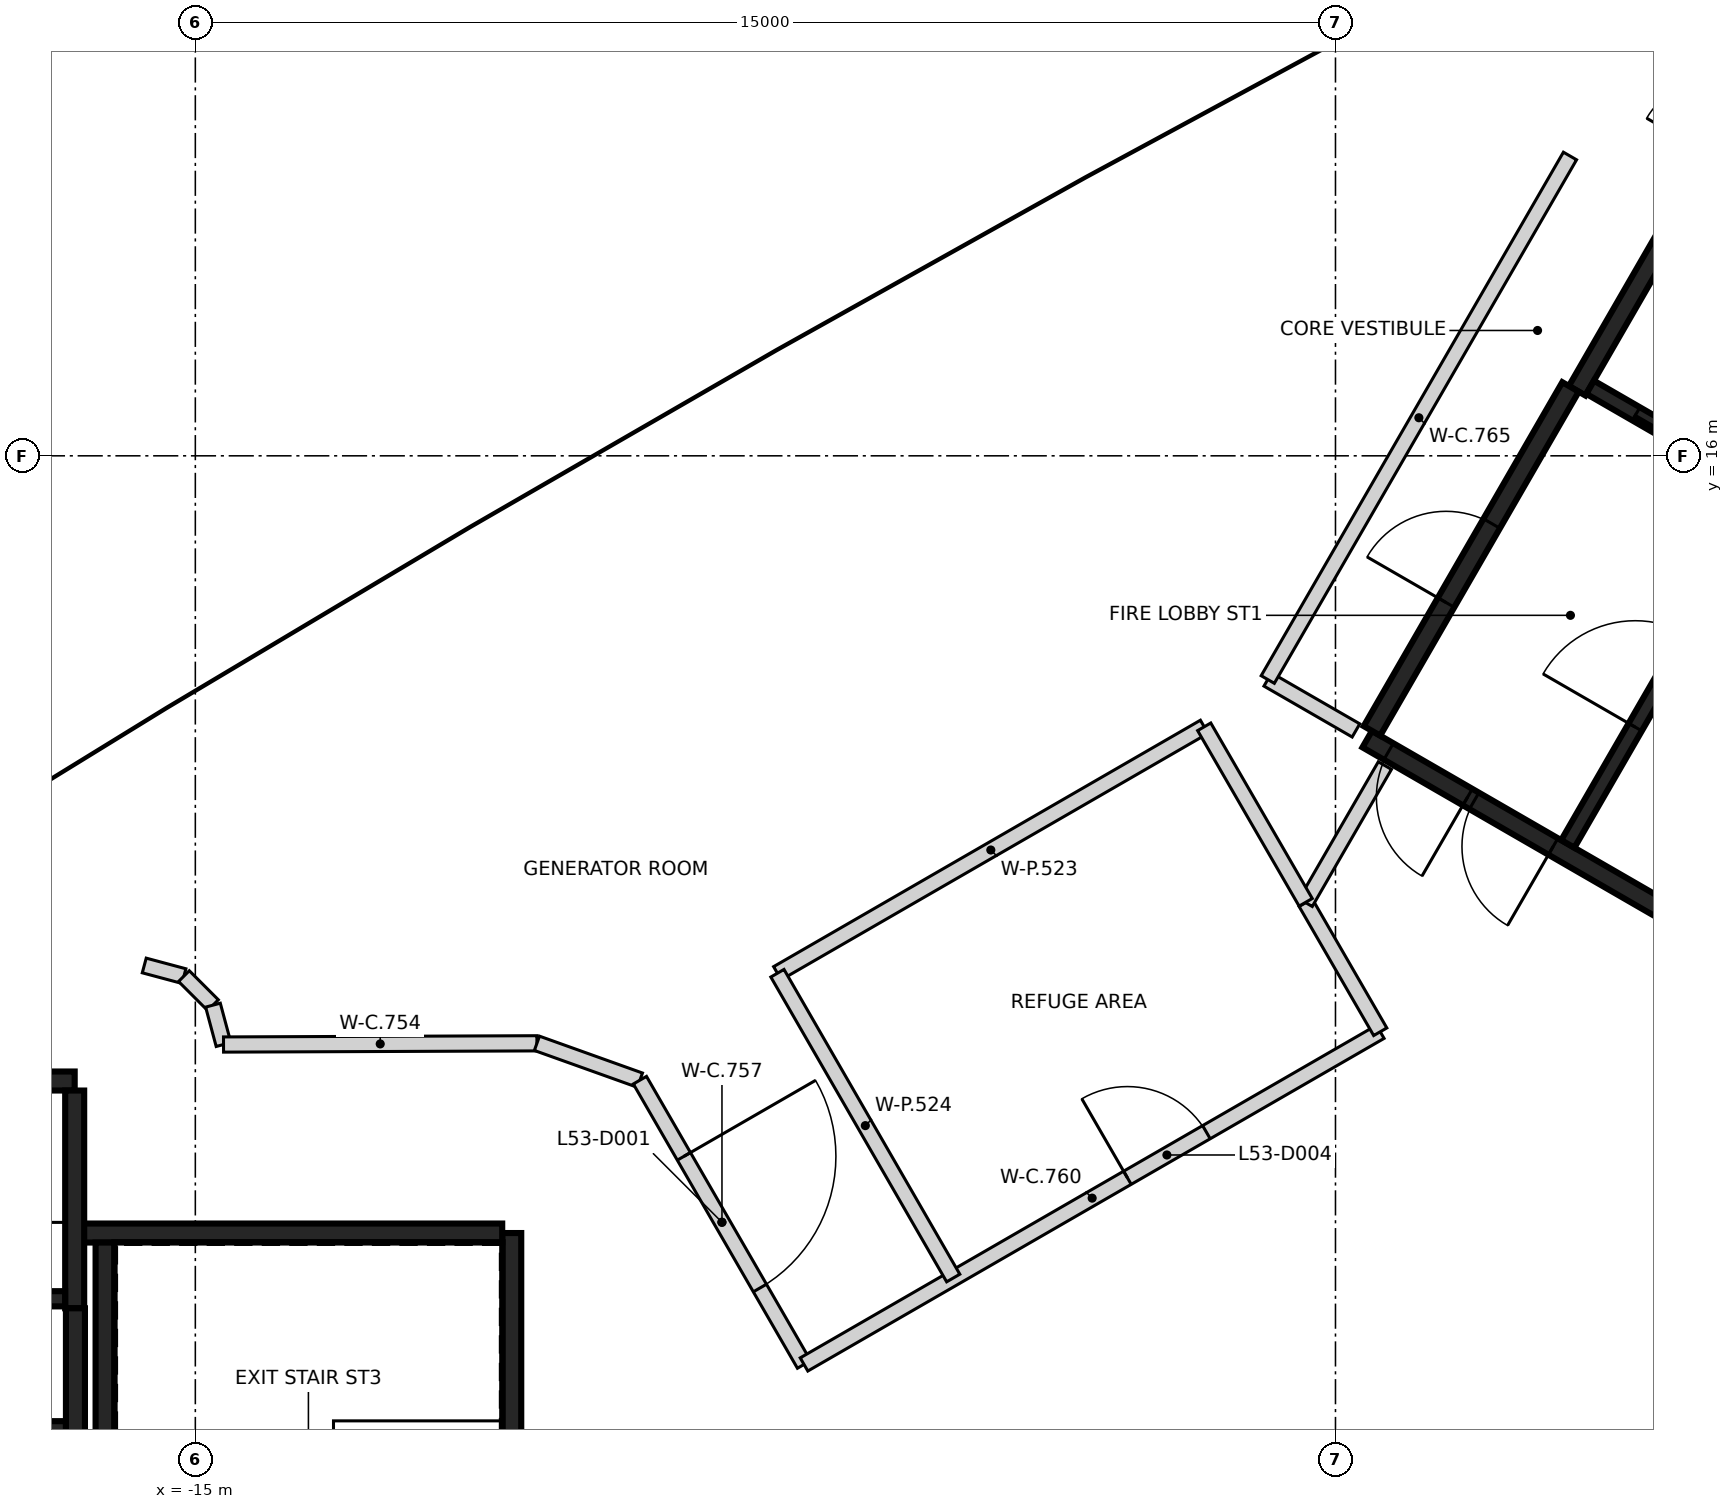
"""IFC4 building model, lengths in metres.
Left out: names, types, materials, properties, quantities, classifications, styles, units other than length and angle.
Written with IfcOpenShell. Run it as: python <this file> out.ifc"""

import sys

from ifc_helpers import new_model, si_unit, direction, frame, frame_2d, origin, place, context, subcontext, project, spatial, rectangle, extrude, element, fill, save


model = new_model("IFC4")
c1 = context("Model", 3, precision=1e-05, world=origin(), true_north=direction((0.0, 1.0)))
c2 = subcontext(c1, "Body", "Model", "MODEL_VIEW")
j1 = project(units=[si_unit("LENGTHUNIT", "METRE"), si_unit("PLANEANGLEUNIT", "RADIAN")], contexts=[c1])
p1 = place(None, origin())
s1 = spatial("IfcSite", under=j1, at=p1, CompositionType="ELEMENT")
p2 = place(p1, origin())
s2 = spatial("IfcBuilding", under=s1, at=p2, CompositionType="ELEMENT")
p3 = place(p2, frame((0.0, 0.0, 211.6)))
s3 = spatial("IfcBuildingStorey", under=s2, at=p3, CompositionType="ELEMENT", Elevation=211.6)
p4 = place(p3, frame((-10.837, 5.775, 0.0), z_axis=(0.0, 0.0, 1.0), x_axis=(0.0, -1.0, 0.0)))
e1 = element("IfcWall", 1, at=p4, inside=s3, PredefinedType="SHEAR", context=c2, shape_type="SweptSolid", body=[
    extrude(rectangle(XDim=11.55, YDim=0.25, at=frame_2d((5.775, 0.0))), origin(), (0.0, 0.0, 1.0), 4.45),
])
p5 = place(p4, frame((10.025, 0.0, 0.0)))
e2 = element("IfcOpeningElement", 2, at=p5, cuts=e1, PredefinedType="OPENING", context=c2, shape_type="SweptSolid", body=[
    extrude(rectangle(XDim=1.2, YDim=2.1, at=frame_2d((0.6, 1.05))), frame((0.0, 0.135, 0.0), z_axis=(0.0, -1.0, 0.0), x_axis=(1.0, 0.0, 0.0)), (0.0, 0.0, 1.0), 0.27),
])
p6 = place(p4, frame((8.725, 0.0, 0.0)))
e3 = element("IfcOpeningElement", 3, at=p6, cuts=e1, PredefinedType="OPENING", context=c2, shape_type="SweptSolid", body=[
    extrude(rectangle(XDim=1.2, YDim=2.1, at=frame_2d((0.6, 1.05))), frame((0.0, 0.135, 0.0), z_axis=(0.0, -1.0, 0.0), x_axis=(1.0, 0.0, 0.0)), (0.0, 0.0, 1.0), 0.27),
])
p7 = place(p3, frame((-16.472, 5.775, 0.0), z_axis=(0.0, 0.0, 1.0), x_axis=(1.0, 0.0, 0.0)))
e4 = element("IfcWall", 4, at=p7, inside=s3, PredefinedType="SHEAR", context=c2, shape_type="SweptSolid", body=[
    extrude(rectangle(XDim=5.51, YDim=0.25, at=frame_2d((2.755, 0.0))), origin(), (0.0, 0.0, 1.0), 4.45),
])
p8 = place(p3, frame((-19.637, 7.775, 0.0), z_axis=(0.0, 0.0, 1.0), x_axis=(1.0, 0.0, 0.0)))
e5 = element("IfcWall", 5, at=p8, inside=s3, PredefinedType="SHEAR", context=c2, shape_type="SweptSolid", body=[
    extrude(rectangle(XDim=3.05, YDim=0.25, at=frame_2d((1.525, 0.0))), origin(), (0.0, 0.0, 1.0), 4.45),
])
p9 = place(p3, frame((-16.587, 7.65, 0.0), z_axis=(0.0, 0.0, 1.0), x_axis=(0.0, -1.0, 0.0)))
e6 = element("IfcWall", 6, at=p9, inside=s3, PredefinedType="SHEAR", context=c2, shape_type="SweptSolid", body=[
    extrude(rectangle(XDim=2.865, YDim=0.25, at=frame_2d((1.432, 0.0))), origin(), (0.0, 0.0, 1.0), 4.45),
])
p10 = place(p3, frame((-16.187, 3.075, 0.0), z_axis=(0.0, 0.0, 1.0), x_axis=(0.0, 1.0, 0.0)))
e7 = element("IfcWall", 7, at=p10, inside=s3, PredefinedType="SHEAR", context=c2, shape_type="SweptSolid", body=[
    extrude(rectangle(XDim=2.575, YDim=0.25, at=frame_2d((1.287, 0.0))), origin(), (0.0, 0.0, 1.0), 4.45),
])
p11 = place(p3, frame((-16.577, 4.785, 0.0), z_axis=(0.0, 0.0, 1.0), x_axis=(0.0, -1.0, 0.0)))
e8 = element("IfcWall", 8, at=p11, inside=s3, PredefinedType="SHEAR", context=c2, shape_type="SweptSolid", body=[
    extrude(rectangle(XDim=1.71, YDim=0.25, at=frame_2d((0.855, 0.0))), origin(), (0.0, 0.0, 1.0), 4.45),
])
p12 = place(p3, frame((-19.511, 4.91, 0.0), z_axis=(0.0, 0.0, 1.0), x_axis=(1.0, 0.0, 0.0)))
e9 = element("IfcWall", 9, at=p12, inside=s3, PredefinedType="SHEAR", context=c2, shape_type="SweptSolid", body=[
    extrude(rectangle(XDim=2.798, YDim=0.2, at=frame_2d((1.399, 0.0))), origin(), (0.0, 0.0, 1.0), 4.45),
])
p13 = place(p12, frame((0.949, 0.0, 0.0)))
e10 = element("IfcOpeningElement", 10, at=p13, cuts=e9, PredefinedType="OPENING", context=c2, shape_type="SweptSolid", body=[
    extrude(rectangle(XDim=0.9, YDim=2.1, at=frame_2d((0.45, 1.05))), frame((0.0, 0.11, 0.0), z_axis=(0.0, -1.0, 0.0), x_axis=(1.0, 0.0, 0.0)), (0.0, 0.0, 1.0), 0.22),
])
p14 = place(p3, frame((-19.462, 3.2, 0.0), z_axis=(0.0, 0.0, 1.0), x_axis=(1.0, 0.0, 0.0)))
e11 = element("IfcWall", 11, at=p14, inside=s3, PredefinedType="SHEAR", context=c2, shape_type="SweptSolid", body=[
    extrude(rectangle(XDim=2.759, YDim=0.2, at=frame_2d((1.379, 0.0))), origin(), (0.0, 0.0, 1.0), 4.45),
])
p15 = place(p3, frame((10.42, 6.498, 0.0), z_axis=(0.0, 0.0, 1.0), x_axis=(-0.866021906294, 0.500006057782, 0.0)))
e12 = element("IfcWall", 12, at=p15, inside=s3, PredefinedType="SHEAR", context=c2, shape_type="SweptSolid", body=[
    extrude(rectangle(XDim=11.55, YDim=0.25, at=frame_2d((5.775, 0.0))), origin(), (0.0, 0.0, 1.0), 4.45),
])
p16 = place(p15, frame((10.025, 0.0, 0.0)))
e13 = element("IfcOpeningElement", 13, at=p16, cuts=e12, PredefinedType="OPENING", context=c2, shape_type="SweptSolid", body=[
    extrude(rectangle(XDim=1.2, YDim=2.1, at=frame_2d((0.6, 1.05))), frame((0.0, 0.135, 0.0), z_axis=(0.0, -1.0, 0.0), x_axis=(1.0, 0.0, 0.0)), (0.0, 0.0, 1.0), 0.27),
])
p17 = place(p15, frame((8.725, 0.0, 0.0)))
e14 = element("IfcOpeningElement", 14, at=p17, cuts=e12, PredefinedType="OPENING", context=c2, shape_type="SweptSolid", body=[
    extrude(rectangle(XDim=1.2, YDim=2.1, at=frame_2d((0.6, 1.05))), frame((0.0, 0.135, 0.0), z_axis=(0.0, -1.0, 0.0), x_axis=(1.0, 0.0, 0.0)), (0.0, 0.0, 1.0), 0.27),
])
p18 = place(p3, frame((3.179, 16.856, 0.0), z_axis=(0.0, 0.0, 1.0), x_axis=(0.500001955336, 0.866024274868, 0.0)))
e15 = element("IfcWall", 15, at=p18, inside=s3, PredefinedType="SHEAR", context=c2, shape_type="SweptSolid", body=[
    extrude(rectangle(XDim=6.125, YDim=0.25, at=frame_2d((3.062, 0.0))), origin(), (0.0, 0.0, 1.0), 4.45),
])
p19 = place(p18, frame((3.563, 0.0, 0.0)))
e16 = element("IfcOpeningElement", 16, at=p19, cuts=e15, PredefinedType="OPENING", context=c2, shape_type="SweptSolid", body=[
    extrude(rectangle(XDim=1.0, YDim=2.1, at=frame_2d((0.5, 1.05))), frame((0.0, 0.135, 0.0), z_axis=(0.0, -1.0, 0.0), x_axis=(1.0, 0.0, 0.0)), (0.0, 0.0, 1.0), 0.27),
])
p20 = place(p3, frame((0.48, 12.381, 0.0), z_axis=(0.0, 0.0, 1.0), x_axis=(0.49999885962, 0.866026062182, 0.0)))
e17 = element("IfcWall", 17, at=p20, inside=s3, PredefinedType="SHEAR", context=c2, shape_type="SweptSolid", body=[
    extrude(rectangle(XDim=5.225, YDim=0.25, at=frame_2d((2.612, 0.0))), origin(), (0.0, 0.0, 1.0), 4.45),
])
p21 = place(p20, frame((1.95, 0.0, 0.0)))
e18 = element("IfcOpeningElement", 18, at=p21, cuts=e17, PredefinedType="OPENING", context=c2, shape_type="SweptSolid", body=[
    extrude(rectangle(XDim=1.2, YDim=2.1, at=frame_2d((0.6, 1.05))), frame((0.0, 0.135, 0.0), z_axis=(0.0, -1.0, 0.0), x_axis=(1.0, 0.0, 0.0)), (0.0, 0.0, 1.0), 0.27),
])
p22 = place(p3, frame((3.057, 10.895, 0.0), z_axis=(0.0, 0.0, 1.0), x_axis=(0.500027839223, 0.866009330205, 0.0)))
e19 = element("IfcWall", 19, at=p22, inside=s3, PredefinedType="SHEAR", context=c2, shape_type="SweptSolid", body=[
    extrude(rectangle(XDim=5.098, YDim=0.2, at=frame_2d((2.549, 0.0))), origin(), (0.0, 0.0, 1.0), 4.45),
])
p23 = place(p22, frame((1.774, 0.0, 0.0)))
e20 = element("IfcOpeningElement", 20, at=p23, cuts=e19, PredefinedType="OPENING", context=c2, shape_type="SweptSolid", body=[
    extrude(rectangle(XDim=1.4, YDim=2.1, at=frame_2d((0.7, 1.05))), frame((0.0, 0.11, 0.0), z_axis=(0.0, -1.0, 0.0), x_axis=(1.0, 0.0, 0.0)), (0.0, 0.0, 1.0), 0.22),
])
p24 = place(p3, frame((5.646, 15.576, 0.0), z_axis=(0.0, 0.0, 1.0), x_axis=(-0.866018407898, 0.500012117035, 0.0)))
e21 = element("IfcWall", 21, at=p24, inside=s3, PredefinedType="SHEAR", context=c2, shape_type="SweptSolid", body=[
    extrude(rectangle(XDim=2.651, YDim=0.2, at=frame_2d((1.325, 0.0))), origin(), (0.0, 0.0, 1.0), 4.45),
])
p25 = place(p24, frame((0.652, 0.0, 0.0)))
e22 = element("IfcOpeningElement", 22, at=p25, cuts=e21, PredefinedType="OPENING", context=c2, shape_type="SweptSolid", body=[
    extrude(rectangle(XDim=1.3, YDim=2.1, at=frame_2d((0.65, 1.05))), frame((0.0, 0.11, 0.0), z_axis=(0.0, -1.0, 0.0), x_axis=(1.0, 0.0, 0.0)), (0.0, 0.0, 1.0), 0.22),
])
p26 = place(p3, frame((-15.672, 9.295, 0.0), z_axis=(0.0, 0.0, 1.0), x_axis=(0.965942005015, -0.258758657725, 0.0)))
e23 = element("IfcWall", 23, at=p26, inside=s3, PredefinedType="PARTITIONING", context=c2, shape_type="SweptSolid", body=[
    extrude(rectangle(XDim=0.541, YDim=0.2, at=frame_2d((0.27, 0.0))), origin(), (0.0, 0.0, 1.0), 4.45),
])
p27 = place(p3, frame((-15.15, 9.155, 0.0), z_axis=(0.0, 0.0, 1.0), x_axis=(0.706880760177, -0.707332729973, 0.0)))
e24 = element("IfcWall", 24, at=p27, inside=s3, PredefinedType="PARTITIONING", context=c2, shape_type="SweptSolid", body=[
    extrude(rectangle(XDim=0.54, YDim=0.2, at=frame_2d((0.27, 0.0))), origin(), (0.0, 0.0, 1.0), 4.45),
])
p28 = place(p3, frame((-14.768, 8.773, 0.0), z_axis=(0.0, 0.0, 1.0), x_axis=(0.259418497784, -0.965765004029, 0.0)))
e25 = element("IfcWall", 25, at=p28, inside=s3, PredefinedType="PARTITIONING", context=c2, shape_type="SweptSolid", body=[
    extrude(rectangle(XDim=0.536, YDim=0.2, at=frame_2d((0.268, 0.0))), origin(), (0.0, 0.0, 1.0), 4.45),
])
p29 = place(p3, frame((-14.629, 8.255, 0.0), z_axis=(0.0, 0.0, 1.0), x_axis=(0.999992362559, 0.003908302003, 0.0)))
e26 = element("IfcWall", 26, at=p29, inside=s3, PredefinedType="PARTITIONING", context=c2, shape_type="SweptSolid", body=[
    extrude(rectangle(XDim=4.123, YDim=0.2, at=frame_2d((2.062, 0.0))), origin(), (0.0, 0.0, 1.0), 4.45),
])
p30 = place(p3, frame((-10.506, 8.271, 0.0), z_axis=(0.0, 0.0, 1.0), x_axis=(0.941499917848, -0.337013211451, 0.0)))
e27 = element("IfcWall", 27, at=p30, inside=s3, PredefinedType="PARTITIONING", context=c2, shape_type="SweptSolid", body=[
    extrude(rectangle(XDim=1.439, YDim=0.2, at=frame_2d((0.72, 0.0))), origin(), (0.0, 0.0, 1.0), 4.45),
])
p31 = place(p3, frame((-9.151, 7.786, 0.0), z_axis=(0.0, 0.0, 1.0), x_axis=(0.499939416935, -0.866060378608, 0.0)))
e28 = element("IfcWall", 28, at=p31, inside=s3, PredefinedType="PARTITIONING", context=c2, shape_type="SweptSolid", body=[
    extrude(rectangle(XDim=4.318, YDim=0.2, at=frame_2d((2.159, 0.0))), origin(), (0.0, 0.0, 1.0), 4.45),
])
p32 = place(p31, frame((1.157, 0.0, 0.0)))
e29 = element("IfcOpeningElement", 29, at=p32, cuts=e28, PredefinedType="OPENING", context=c2, shape_type="SweptSolid", body=[
    extrude(rectangle(XDim=2.0, YDim=2.1, at=frame_2d((1.0, 1.05))), frame((0.0, 0.11, 0.0), z_axis=(0.0, -1.0, 0.0), x_axis=(1.0, 0.0, 0.0)), (0.0, 0.0, 1.0), 0.22),
])
p33 = place(p3, frame((-6.992, 4.046, 0.0), z_axis=(0.0, 0.0, 1.0), x_axis=(0.866074131153, 0.499915592224, 0.0)))
e30 = element("IfcWall", 30, at=p33, inside=s3, PredefinedType="PARTITIONING", context=c2, shape_type="SweptSolid", body=[
    extrude(rectangle(XDim=8.754, YDim=0.2, at=frame_2d((4.377, 0.0))), origin(), (0.0, 0.0, 1.0), 4.45),
])
p34 = place(p33, frame((4.913, 0.0, 0.0)))
e31 = element("IfcOpeningElement", 31, at=p34, cuts=e30, PredefinedType="OPENING", context=c2, shape_type="SweptSolid", body=[
    extrude(rectangle(XDim=1.2, YDim=2.1, at=frame_2d((0.6, 1.05))), frame((0.0, 0.11, 0.0), z_axis=(0.0, -1.0, 0.0), x_axis=(1.0, 0.0, 0.0)), (0.0, 0.0, 1.0), 0.22),
])
p35 = place(p3, frame((-0.891, 13.057, 0.0), z_axis=(0.0, 0.0, 1.0), x_axis=(0.866206814563, -0.499685655593, 0.0)))
e32 = element("IfcWall", 32, at=p35, inside=s3, PredefinedType="PARTITIONING", context=c2, shape_type="SweptSolid", body=[
    extrude(rectangle(XDim=1.34, YDim=0.2, at=frame_2d((0.67, 0.0))), origin(), (0.0, 0.0, 1.0), 4.45),
])
p36 = place(p3, frame((-0.891, 13.057, 0.0), z_axis=(0.0, 0.0, 1.0), x_axis=(0.499972238474, 0.866041431316, 0.0)))
e33 = element("IfcWall", 33, at=p36, inside=s3, PredefinedType="PARTITIONING", context=c2, shape_type="SweptSolid", body=[
    extrude(rectangle(XDim=7.953, YDim=0.2, at=frame_2d((3.977, 0.0))), origin(), (0.0, 0.0, 1.0), 4.45),
])
p37 = place(p3, frame((-0.392, 10.121, 0.0), z_axis=(0.0, 0.0, 1.0), x_axis=(0.500329449036, -0.865835112725, 0.0)))
e34 = element("IfcWall", 34, at=p37, inside=s3, PredefinedType="PARTITIONING", context=c2, shape_type="SweptSolid", body=[
    extrude(rectangle(XDim=1.961, YDim=0.2, at=frame_2d((0.98, 0.0))), origin(), (0.0, 0.0, 1.0), 4.45),
])
p38 = place(p3, frame((-0.392, 10.121, 0.0), z_axis=(0.0, 0.0, 1.0), x_axis=(0.50017216111, 0.865925983702, 0.0)))
e35 = element("IfcWall", 35, at=p38, inside=s3, PredefinedType="PARTITIONING", context=c2, shape_type="SweptSolid", body=[
    extrude(rectangle(XDim=2.083, YDim=0.2, at=frame_2d((1.042, 0.0))), origin(), (0.0, 0.0, 1.0), 4.45),
])
p39 = place(p3, frame((-7.342, 9.193, 0.0), z_axis=(0.0, 0.0, 1.0), x_axis=(0.866016906217, 0.500014717929, 0.0)))
e36 = element("IfcWall", 36, at=p39, inside=s3, PredefinedType="PARTITIONING", context=c2, shape_type="SweptSolid", body=[
    extrude(rectangle(XDim=6.484, YDim=0.2, at=frame_2d((3.242, 0.0))), origin(), (0.0, 0.0, 1.0), 4.45),
])
p40 = place(p3, frame((-7.342, 9.193, 0.0), z_axis=(0.0, 0.0, 1.0), x_axis=(0.499644836288, -0.866230360569, 0.0)))
e37 = element("IfcWall", 37, at=p40, inside=s3, PredefinedType="PARTITIONING", context=c2, shape_type="SweptSolid", body=[
    extrude(rectangle(XDim=4.629, YDim=0.2, at=frame_2d((2.314, 0.0))), origin(), (0.0, 0.0, 1.0), 4.45),
])
p41 = place(p3, frame((-1.727, 12.435, 0.0), z_axis=(0.0, 0.0, 1.0), x_axis=(0.500509380909, -0.865731112772, 0.0)))
e38 = element("IfcWall", 38, at=p41, inside=s3, PredefinedType="PARTITIONING", context=c2, shape_type="SweptSolid", body=[
    extrude(rectangle(XDim=2.667, YDim=0.2, at=frame_2d((1.333, 0.0))), origin(), (0.0, 0.0, 1.0), 4.45),
])
p42 = place(p25, origin())
e39 = element("IfcDoor", 39, at=p42, inside=s3, OperationType="SLIDING_TO_LEFT", PredefinedType="DOOR", context=c2, shape_type="SweptSolid", body=[
    extrude(rectangle(XDim=1.3, YDim=2.1, at=frame_2d((0.65, 1.05))), frame((0.0, 0.025, 0.0), z_axis=(0.0, -1.0, 0.0), x_axis=(1.0, 0.0, 0.0)), (0.0, 0.0, 1.0), 0.05),
])
fill(e22, e39)
p43 = place(p16, origin())
e40 = element("IfcDoor", 40, at=p43, inside=s3, OperationType="SINGLE_SWING_LEFT", PredefinedType="DOOR", context=c2, shape_type="SweptSolid", body=[
    extrude(rectangle(XDim=1.2, YDim=2.1, at=frame_2d((0.6, 1.05))), frame((0.0, 0.025, 0.0), z_axis=(0.0, -1.0, 0.0), x_axis=(1.0, 0.0, 0.0)), (0.0, 0.0, 1.0), 0.05),
])
fill(e13, e40)
p44 = place(p17, origin())
e41 = element("IfcDoor", 41, at=p44, inside=s3, OperationType="SINGLE_SWING_RIGHT", PredefinedType="DOOR", context=c2, shape_type="SweptSolid", body=[
    extrude(rectangle(XDim=1.2, YDim=2.1, at=frame_2d((0.6, 1.05))), frame((0.0, 0.025, 0.0), z_axis=(0.0, -1.0, 0.0), x_axis=(1.0, 0.0, 0.0)), (0.0, 0.0, 1.0), 0.05),
])
fill(e14, e41)
p45 = place(p23, origin())
e42 = element("IfcDoor", 42, at=p45, inside=s3, OperationType="SINGLE_SWING_LEFT", PredefinedType="DOOR", context=c2, shape_type="SweptSolid", body=[
    extrude(rectangle(XDim=1.4, YDim=2.1, at=frame_2d((0.7, 1.05))), frame((0.0, 0.025, 0.0), z_axis=(0.0, -1.0, 0.0), x_axis=(1.0, 0.0, 0.0)), (0.0, 0.0, 1.0), 0.05),
])
fill(e20, e42)
p46 = place(p21, origin())
e43 = element("IfcDoor", 43, at=p46, inside=s3, OperationType="SINGLE_SWING_RIGHT", PredefinedType="DOOR", context=c2, shape_type="SweptSolid", body=[
    extrude(rectangle(XDim=1.2, YDim=2.1, at=frame_2d((0.6, 1.05))), frame((0.0, 0.025, 0.0), z_axis=(0.0, -1.0, 0.0), x_axis=(1.0, 0.0, 0.0)), (0.0, 0.0, 1.0), 0.05),
])
fill(e18, e43)
p47 = place(p32, origin())
e44 = element("IfcDoor", 44, at=p47, inside=s3, OperationType="DOUBLE_DOOR_SINGLE_SWING", PredefinedType="DOOR", context=c2, shape_type="SweptSolid", body=[
    extrude(rectangle(XDim=2.0, YDim=2.1, at=frame_2d((1.0, 1.05))), frame((0.0, 0.025, 0.0), z_axis=(0.0, -1.0, 0.0), x_axis=(1.0, 0.0, 0.0)), (0.0, 0.0, 1.0), 0.05),
])
fill(e29, e44)
p48 = place(p34, origin())
e45 = element("IfcDoor", 45, at=p48, inside=s3, OperationType="SINGLE_SWING_LEFT", PredefinedType="DOOR", context=c2, shape_type="SweptSolid", body=[
    extrude(rectangle(XDim=1.2, YDim=2.1, at=frame_2d((0.6, 1.05))), frame((0.0, 0.025, 0.0), z_axis=(0.0, -1.0, 0.0), x_axis=(1.0, 0.0, 0.0)), (0.0, 0.0, 1.0), 0.05),
])
fill(e31, e45)
save(model, sys.argv[1])
